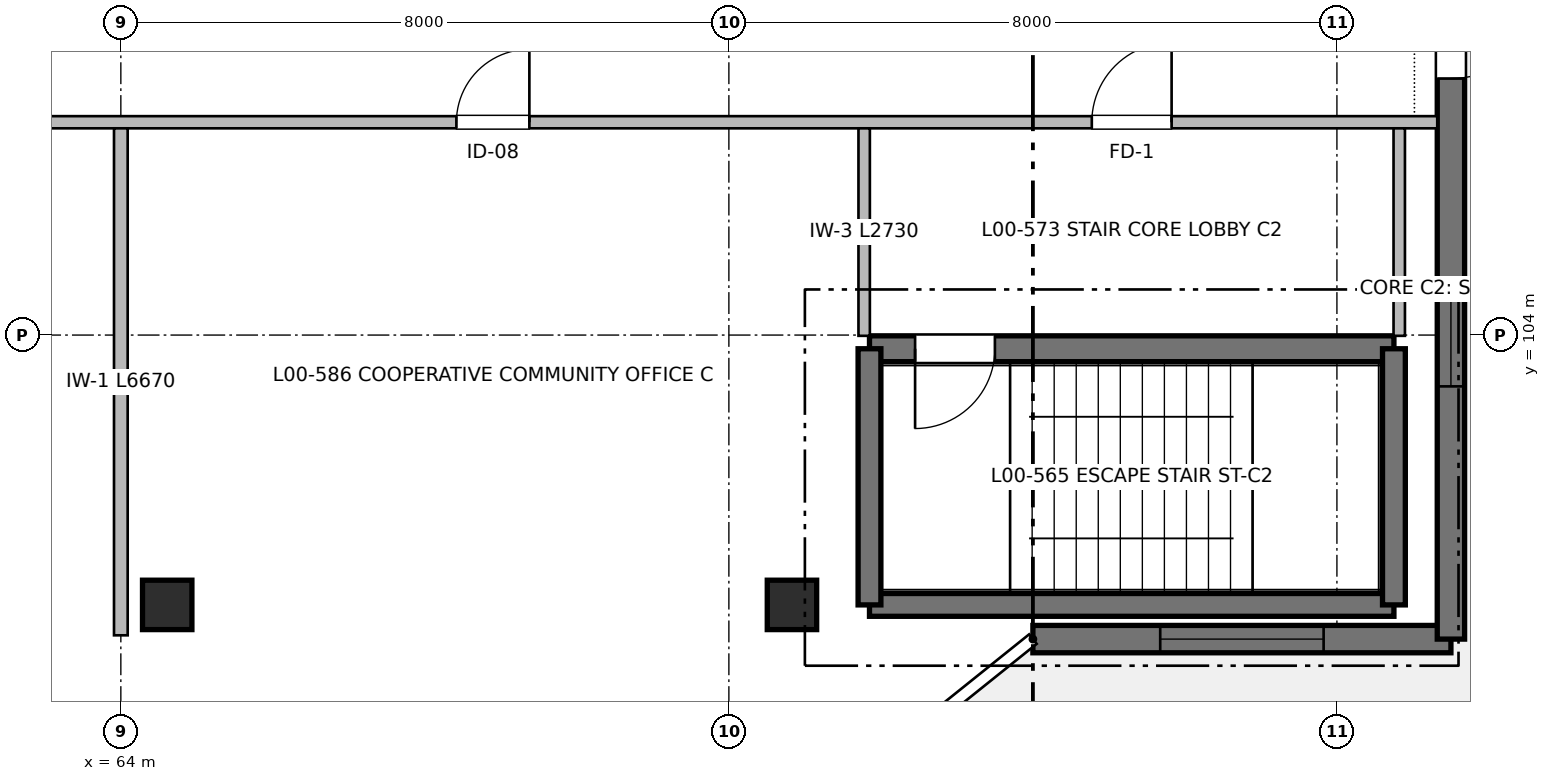
"""IFC4 building model, lengths in metres.
Left out: names, types, materials, properties, quantities, classifications, styles, units other than length and angle.
Written with IfcOpenShell. Run it as: python <this file> out.ifc"""

import sys

from ifc_helpers import new_model, si_unit, direction, frame, frame_2d, origin, origin_2d, place, context, subcontext, project, spatial, rectangle, extrude, element, fill, save


model = new_model("IFC4")
c1 = context("Model", 3, precision=1e-05, world=origin(), true_north=direction((0.0, 1.0)))
c2 = subcontext(c1, "Body", "Model", "MODEL_VIEW")
j1 = project(units=[si_unit("LENGTHUNIT", "METRE"), si_unit("PLANEANGLEUNIT", "RADIAN")], contexts=[c1])
p1 = place(None, origin())
s1 = spatial("IfcSite", under=j1, at=p1, CompositionType="ELEMENT")
p2 = place(p1, origin())
s2 = spatial("IfcBuilding", under=s1, at=p2, CompositionType="ELEMENT")
p3 = place(p2, origin())
s3 = spatial("IfcBuildingStorey", under=s2, at=p3, CompositionType="ELEMENT", Elevation=0.0)
for number, where, z_axis, x_axis in (
    (1, (64.61, 100.45, 0.0), (0.0, 0.0, 1.0), (1.0, 0.0, 0.0)),
    (2, (72.83, 100.45, 0.0), (0.0, 0.0, 1.0), (1.0, 0.0, 0.0)),
):
    element("IfcColumn", number, at=place(p3, frame(where, z_axis=z_axis, x_axis=x_axis)), inside=s3, PredefinedType="COLUMN", context=c2, shape_type="SweptSolid", body=[
        extrude(rectangle(XDim=0.65, YDim=0.65, at=origin_2d()), origin(), (0.0, 0.0, 1.0), 4.16),
    ])
p4 = place(p3, frame((73.85, 100.45, 0.0), z_axis=(0.0, 0.0, 1.0), x_axis=(1.0, 0.0, 0.0)))
e3 = element("IfcWall", 3, at=p4, inside=s3, PredefinedType="SHEAR", context=c2, shape_type="SweptSolid", body=[
    extrude(rectangle(XDim=6.9, YDim=0.3, at=frame_2d((3.45, 0.0))), origin(), (0.0, 0.0, 1.0), 4.16),
])
p5 = place(p3, frame((80.75, 103.82, 0.0), z_axis=(0.0, 0.0, 1.0), x_axis=(-1.0, 0.0, 0.0)))
e4 = element("IfcWall", 4, at=p5, inside=s3, PredefinedType="SHEAR", context=c2, shape_type="SweptSolid", body=[
    extrude(rectangle(XDim=6.9, YDim=0.34, at=frame_2d((3.45, 0.0))), origin(), (0.0, 0.0, 1.0), 4.16),
])
p6 = place(p5, frame((5.25, 0.0, 0.0)))
e5 = element("IfcOpeningElement", 5, at=p6, cuts=e4, PredefinedType="OPENING", context=c2, shape_type="SweptSolid", body=[
    extrude(rectangle(XDim=1.05, YDim=2.15, at=frame_2d((0.525, 1.075))), frame((0.0, 0.18, 0.0), z_axis=(0.0, -1.0, 0.0), x_axis=(1.0, 0.0, 0.0)), (0.0, 0.0, 1.0), 0.36),
])
for number, where, z_axis, x_axis in (
    (6, (73.85, 103.82, 0.0), (0.0, 0.0, 1.0), (0.0, -1.0, 0.0)),
    (7, (80.75, 100.45, 0.0), (0.0, 0.0, 1.0), (0.0, 1.0, 0.0)),
):
    element("IfcWall", number, at=place(p3, frame(where, z_axis=z_axis, x_axis=x_axis)), inside=s3, PredefinedType="SHEAR", context=c2, shape_type="SweptSolid", body=[
        extrude(rectangle(XDim=3.37, YDim=0.3, at=frame_2d((1.685, 0.0))), origin(), (0.0, 0.0, 1.0), 4.16),
    ])
p7 = place(p3, frame((81.5, 100.0, 0.0), z_axis=(0.0, 0.0, 1.0), x_axis=(-1.0, 0.0, 0.0)))
e8 = element("IfcWall", 8, at=p7, inside=s3, PredefinedType="SHEAR", context=c2, shape_type="SweptSolid", body=[
    extrude(rectangle(XDim=5.5, YDim=0.36, at=frame_2d((2.75, 0.0))), origin(), (0.0, 0.0, 1.0), 3.94),
])
p8 = place(p7, frame((1.675, 0.0, 0.95)))
e9 = element("IfcOpeningElement", 9, at=p8, cuts=e8, PredefinedType="OPENING", context=c2, shape_type="SweptSolid", body=[
    extrude(rectangle(XDim=2.15, YDim=1.8, at=frame_2d((1.075, 0.9))), frame((0.0, 0.19, 0.0), z_axis=(0.0, -1.0, 0.0), x_axis=(1.0, 0.0, 0.0)), (0.0, 0.0, 1.0), 0.38),
])
p9 = place(p3, frame((81.5, 116.0, 0.0), z_axis=(0.0, 0.0, 1.0), x_axis=(0.0, -1.0, 0.0)))
e10 = element("IfcWall", 10, at=p9, inside=s3, PredefinedType="SHEAR", context=c2, shape_type="SweptSolid", body=[
    extrude(rectangle(XDim=16.0, YDim=0.36, at=frame_2d((8.0, 0.0))), origin(), (0.0, 0.0, 1.0), 3.94),
])
p10 = place(p9, frame((7.375, 0.0, 0.0)))
e11 = element("IfcOpeningElement", 11, at=p10, cuts=e10, PredefinedType="OPENING", context=c2, shape_type="SweptSolid", body=[
    extrude(rectangle(XDim=1.25, YDim=2.2, at=frame_2d((0.625, 1.1))), frame((0.0, 0.19, 0.0), z_axis=(0.0, -1.0, 0.0), x_axis=(1.0, 0.0, 0.0)), (0.0, 0.0, 1.0), 0.38),
])
p11 = place(p9, frame((11.325, 0.0, 0.95)))
e12 = element("IfcOpeningElement", 12, at=p11, cuts=e10, PredefinedType="OPENING", context=c2, shape_type="SweptSolid", body=[
    extrude(rectangle(XDim=1.35, YDim=1.3, at=frame_2d((0.675, 0.65))), frame((0.0, 0.19, 0.0), z_axis=(0.0, -1.0, 0.0), x_axis=(1.0, 0.0, 0.0)), (0.0, 0.0, 1.0), 0.38),
])
p12 = place(p3, frame((57.2, 106.8, 0.0), z_axis=(0.0, 0.0, 1.0), x_axis=(1.0, 0.0, 0.0)))
e13 = element("IfcWall", 13, at=p12, inside=s3, PredefinedType="PARTITIONING", context=c2, shape_type="SweptSolid", body=[
    extrude(rectangle(XDim=24.12, YDim=0.16, at=frame_2d((12.06, 0.0))), origin(), (0.0, 0.0, 1.0), 3.895),
])
p13 = place(p12, frame((19.575, 0.0, 0.0)))
e14 = element("IfcOpeningElement", 14, at=p13, cuts=e13, PredefinedType="OPENING", context=c2, shape_type="SweptSolid", body=[
    extrude(rectangle(XDim=1.05, YDim=2.15, at=frame_2d((0.525, 1.075))), frame((0.0, 0.09, 0.0), z_axis=(0.0, -1.0, 0.0), x_axis=(1.0, 0.0, 0.0)), (0.0, 0.0, 1.0), 0.18),
])
p14 = place(p12, frame((11.215, 0.0, 0.0)))
e15 = element("IfcOpeningElement", 15, at=p14, cuts=e13, PredefinedType="OPENING", context=c2, shape_type="SweptSolid", body=[
    extrude(rectangle(XDim=0.96, YDim=2.15, at=frame_2d((0.48, 1.075))), frame((0.0, 0.09, 0.0), z_axis=(0.0, -1.0, 0.0), x_axis=(1.0, 0.0, 0.0)), (0.0, 0.0, 1.0), 0.18),
])
p15 = place(p3, frame((64.0, 100.05, 0.0), z_axis=(0.0, 0.0, 1.0), x_axis=(0.0, 1.0, 0.0)))
e16 = element("IfcWall", 16, at=p15, inside=s3, PredefinedType="PARTITIONING", context=c2, shape_type="SweptSolid", body=[
    extrude(rectangle(XDim=6.67, YDim=0.18, at=frame_2d((3.335, 0.0))), origin(), (0.0, 0.0, 1.0), 3.895),
])
for number, where, z_axis, x_axis in (
    (17, (73.78, 103.99, 0.0), (0.0, 0.0, 1.0), (0.0, 1.0, 0.0)),
    (18, (80.82, 103.99, 0.0), (0.0, 0.0, 1.0), (0.0, 1.0, 0.0)),
):
    element("IfcWall", number, at=place(p3, frame(where, z_axis=z_axis, x_axis=x_axis)), inside=s3, PredefinedType="PARTITIONING", context=c2, shape_type="SweptSolid", body=[
        extrude(rectangle(XDim=2.73, YDim=0.15, at=frame_2d((1.365, 0.0))), origin(), (0.0, 0.0, 1.0), 3.895),
    ])
p16 = place(p6, origin())
e19 = element("IfcDoor", 19, at=p16, inside=s3, OperationType="SINGLE_SWING_RIGHT", PredefinedType="DOOR", context=c2, shape_type="SweptSolid", body=[
    extrude(rectangle(XDim=1.05, YDim=2.15, at=frame_2d((0.525, 1.075))), frame((0.0, 0.025, 0.0), z_axis=(0.0, -1.0, 0.0), x_axis=(1.0, 0.0, 0.0)), (0.0, 0.0, 1.0), 0.05),
])
fill(e5, e19)
p17 = place(p8, origin())
e20 = element("IfcWindow", 20, at=p17, inside=s3, PartitioningType="SINGLE_PANEL", PredefinedType="WINDOW", context=c2, shape_type="SweptSolid", body=[
    extrude(rectangle(XDim=2.15, YDim=1.8, at=frame_2d((1.075, 0.9))), frame((0.0, 0.03, 0.0), z_axis=(0.0, -1.0, 0.0), x_axis=(1.0, 0.0, 0.0)), (0.0, 0.0, 1.0), 0.06),
])
fill(e9, e20)
p18 = place(p10, origin())
e21 = element("IfcDoor", 21, at=p18, inside=s3, OperationType="SINGLE_SWING_LEFT", PredefinedType="DOOR", context=c2, shape_type="SweptSolid", body=[
    extrude(rectangle(XDim=1.25, YDim=2.2, at=frame_2d((0.625, 1.1))), frame((0.0, 0.025, 0.0), z_axis=(0.0, -1.0, 0.0), x_axis=(1.0, 0.0, 0.0)), (0.0, 0.0, 1.0), 0.05),
])
fill(e11, e21)
p19 = place(p11, origin())
e22 = element("IfcWindow", 22, at=p19, inside=s3, PartitioningType="SINGLE_PANEL", PredefinedType="WINDOW", context=c2, shape_type="SweptSolid", body=[
    extrude(rectangle(XDim=1.35, YDim=1.3, at=frame_2d((0.675, 0.65))), frame((0.0, 0.03, 0.0), z_axis=(0.0, -1.0, 0.0), x_axis=(1.0, 0.0, 0.0)), (0.0, 0.0, 1.0), 0.06),
])
fill(e12, e22)
p20 = place(p13, origin())
e23 = element("IfcDoor", 23, at=p20, inside=s3, OperationType="SINGLE_SWING_RIGHT", PredefinedType="DOOR", context=c2, shape_type="SweptSolid", body=[
    extrude(rectangle(XDim=1.05, YDim=2.15, at=frame_2d((0.525, 1.075))), frame((0.0, 0.025, 0.0), z_axis=(0.0, -1.0, 0.0), x_axis=(1.0, 0.0, 0.0)), (0.0, 0.0, 1.0), 0.05),
])
fill(e14, e23)
p21 = place(p14, origin())
e24 = element("IfcDoor", 24, at=p21, inside=s3, OperationType="SINGLE_SWING_RIGHT", PredefinedType="DOOR", context=c2, shape_type="SweptSolid", body=[
    extrude(rectangle(XDim=0.96, YDim=2.15, at=frame_2d((0.48, 1.075))), frame((0.0, 0.025, 0.0), z_axis=(0.0, -1.0, 0.0), x_axis=(1.0, 0.0, 0.0)), (0.0, 0.0, 1.0), 0.05),
])
fill(e15, e24)
save(model, sys.argv[1])
